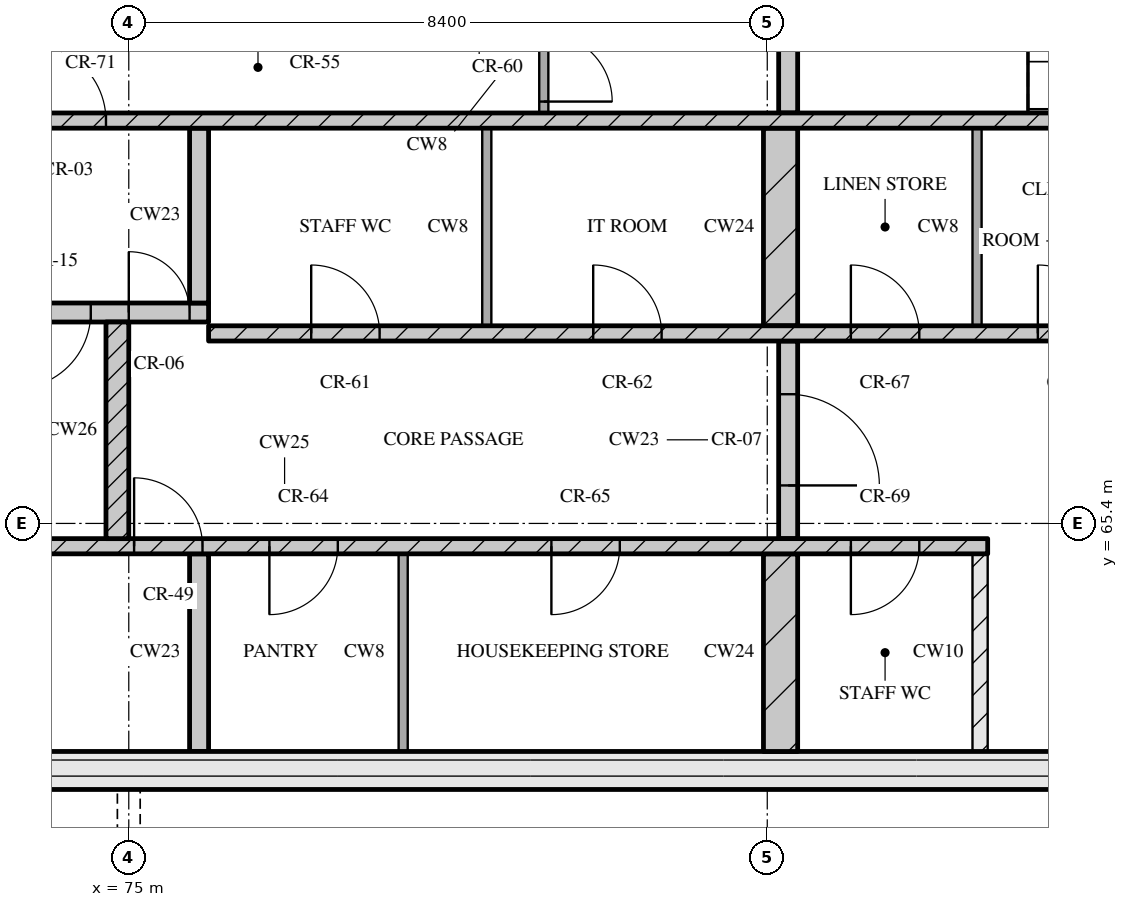
"""IFC4 building model, lengths in metres.
Left out: names, types, materials, properties, quantities, classifications, styles, units other than length and angle.
Written with IfcOpenShell. Run it as: python <this file> out.ifc"""

import sys

from ifc_helpers import new_model, si_unit, direction, frame, frame_2d, origin, place, context, subcontext, project, spatial, rectangle, extrude, element, fill, save


model = new_model("IFC4")
c1 = context("Model", 3, precision=1e-05, world=origin(), true_north=direction((0.0, 1.0)))
c2 = subcontext(c1, "Body", "Model", "MODEL_VIEW")
j1 = project(units=[si_unit("LENGTHUNIT", "METRE"), si_unit("PLANEANGLEUNIT", "RADIAN")], contexts=[c1])
p1 = place(None, origin())
s1 = spatial("IfcSite", under=j1, at=p1, CompositionType="ELEMENT")
p2 = place(p1, origin())
s2 = spatial("IfcBuilding", under=s1, at=p2, CompositionType="ELEMENT")
p3 = place(p2, frame((0.0, 0.0, 274.35)))
s3 = spatial("IfcBuildingStorey", under=s2, at=p3, CompositionType="ELEMENT", Elevation=274.35)
p4 = place(p3, frame((67.3, 62.15, 0.0), z_axis=(0.0, 0.0, 1.0), x_axis=(1.0, 0.0, 0.0)))
e1 = element("IfcWall", 1, at=p4, inside=s3, PredefinedType="SOLIDWALL", context=c2, shape_type="SweptSolid", body=[
    extrude(rectangle(XDim=40.6, YDim=0.5, at=frame_2d((20.3, 0.0))), origin(), (0.0, 0.0, 1.0), 3.32),
])
p5 = place(p4, frame((20.65, 0.0, 0.0)))
e2 = element("IfcOpeningElement", 2, at=p5, cuts=e1, PredefinedType="OPENING", context=c2, shape_type="SweptSolid", body=[
    extrude(rectangle(XDim=1.8, YDim=2.1, at=frame_2d((0.9, 1.05))), frame((0.0, 0.26, 0.0), z_axis=(0.0, -1.0, 0.0), x_axis=(1.0, 0.0, 0.0)), (0.0, 0.0, 1.0), 0.52),
])
p6 = place(p3, frame((75.925, 62.4, 0.0), z_axis=(0.0, 0.0, 1.0), x_axis=(0.0, 1.0, 0.0)))
e3 = element("IfcWall", 3, at=p6, inside=s3, PredefinedType="SOLIDWALL", context=c2, shape_type="SweptSolid", body=[
    extrude(rectangle(XDim=2.6, YDim=0.25, at=frame_2d((1.3, 0.0))), origin(), (0.0, 0.0, 1.0), 3.32),
])
p7 = place(p3, frame((78.61, 62.4, 0.0), z_axis=(0.0, 0.0, 1.0), x_axis=(0.0, 1.0, 0.0)))
e4 = element("IfcWall", 4, at=p7, inside=s3, PredefinedType="PARTITIONING", context=c2, shape_type="SweptSolid", body=[
    extrude(rectangle(XDim=2.6, YDim=0.12, at=frame_2d((1.3, 0.0))), origin(), (0.0, 0.0, 1.0), 3.32),
])
p8 = place(p3, frame((83.575, 62.4, 0.0), z_axis=(0.0, 0.0, 1.0), x_axis=(0.0, 1.0, 0.0)))
e5 = element("IfcWall", 5, at=p8, inside=s3, PredefinedType="SOLIDWALL", context=c2, shape_type="SweptSolid", body=[
    extrude(rectangle(XDim=2.6, YDim=0.45, at=frame_2d((1.3, 0.0))), origin(), (0.0, 0.0, 1.0), 3.32),
])
p9 = place(p3, frame((86.2, 62.4, 0.0), z_axis=(0.0, 0.0, 1.0), x_axis=(0.0, 1.0, 0.0)))
e6 = element("IfcWall", 6, at=p9, inside=s3, PredefinedType="PARTITIONING", context=c2, shape_type="SweptSolid", body=[
    extrude(rectangle(XDim=2.6, YDim=0.2, at=frame_2d((1.3, 0.0))), origin(), (0.0, 0.0, 1.0), 3.32),
])
p10 = place(p3, frame((67.8, 65.1, 0.0), z_axis=(0.0, 0.0, 1.0), x_axis=(1.0, 0.0, 0.0)))
e7 = element("IfcWall", 7, at=p10, inside=s3, PredefinedType="SOLIDWALL", context=c2, shape_type="SweptSolid", body=[
    extrude(rectangle(XDim=18.5, YDim=0.2, at=frame_2d((9.25, 0.0))), origin(), (0.0, 0.0, 1.0), 3.32),
])
p11 = place(p10, frame((7.27, 0.0, 0.0)))
e8 = element("IfcOpeningElement", 8, at=p11, cuts=e7, PredefinedType="OPENING", context=c2, shape_type="SweptSolid", body=[
    extrude(rectangle(XDim=0.9, YDim=2.1, at=frame_2d((0.45, 1.05))), frame((0.0, 0.11, 0.0), z_axis=(0.0, -1.0, 0.0), x_axis=(1.0, 0.0, 0.0)), (0.0, 0.0, 1.0), 0.22),
])
p12 = place(p10, frame((9.05, 0.0, 0.0)))
e9 = element("IfcOpeningElement", 9, at=p12, cuts=e7, PredefinedType="OPENING", context=c2, shape_type="SweptSolid", body=[
    extrude(rectangle(XDim=0.9, YDim=2.1, at=frame_2d((0.45, 1.05))), frame((0.0, 0.11, 0.0), z_axis=(0.0, -1.0, 0.0), x_axis=(1.0, 0.0, 0.0)), (0.0, 0.0, 1.0), 0.22),
])
p13 = place(p10, frame((12.76, 0.0, 0.0)))
e10 = element("IfcOpeningElement", 10, at=p13, cuts=e7, PredefinedType="OPENING", context=c2, shape_type="SweptSolid", body=[
    extrude(rectangle(XDim=0.9, YDim=2.1, at=frame_2d((0.45, 1.05))), frame((0.0, 0.11, 0.0), z_axis=(0.0, -1.0, 0.0), x_axis=(1.0, 0.0, 0.0)), (0.0, 0.0, 1.0), 0.22),
])
p14 = place(p10, frame((16.7, 0.0, 0.0)))
e11 = element("IfcOpeningElement", 11, at=p14, cuts=e7, PredefinedType="OPENING", context=c2, shape_type="SweptSolid", body=[
    extrude(rectangle(XDim=0.9, YDim=2.1, at=frame_2d((0.45, 1.05))), frame((0.0, 0.11, 0.0), z_axis=(0.0, -1.0, 0.0), x_axis=(1.0, 0.0, 0.0)), (0.0, 0.0, 1.0), 0.22),
])
p15 = place(p3, frame((74.85, 65.2, 0.0), z_axis=(0.0, 0.0, 1.0), x_axis=(0.0, 1.0, 0.0)))
e12 = element("IfcWall", 12, at=p15, inside=s3, PredefinedType="SOLIDWALL", context=c2, shape_type="SweptSolid", body=[
    extrude(rectangle(XDim=2.85, YDim=0.3, at=frame_2d((1.425, 0.0))), origin(), (0.0, 0.0, 1.0), 3.32),
])
p16 = place(p3, frame((83.675, 65.2, 0.0), z_axis=(0.0, 0.0, 1.0), x_axis=(0.0, 1.0, 0.0)))
e13 = element("IfcWall", 13, at=p16, inside=s3, PredefinedType="SOLIDWALL", context=c2, shape_type="SweptSolid", body=[
    extrude(rectangle(XDim=2.6, YDim=0.25, at=frame_2d((1.3, 0.0))), origin(), (0.0, 0.0, 1.0), 3.32),
])
p17 = place(p16, frame((0.7, 0.0, 0.0)))
e14 = element("IfcOpeningElement", 14, at=p17, cuts=e13, PredefinedType="OPENING", context=c2, shape_type="SweptSolid", body=[
    extrude(rectangle(XDim=1.2, YDim=2.1, at=frame_2d((0.6, 1.05))), frame((0.0, 0.135, 0.0), z_axis=(0.0, -1.0, 0.0), x_axis=(1.0, 0.0, 0.0)), (0.0, 0.0, 1.0), 0.27),
])
p18 = place(p3, frame((76.05, 67.9, 0.0), z_axis=(0.0, 0.0, 1.0), x_axis=(1.0, 0.0, 0.0)))
e15 = element("IfcWall", 15, at=p18, inside=s3, PredefinedType="SOLIDWALL", context=c2, shape_type="SweptSolid", body=[
    extrude(rectangle(XDim=23.1, YDim=0.2, at=frame_2d((11.55, 0.0))), origin(), (0.0, 0.0, 1.0), 3.32),
])
p19 = place(p18, frame((1.35, 0.0, 0.0)))
e16 = element("IfcOpeningElement", 16, at=p19, cuts=e15, PredefinedType="OPENING", context=c2, shape_type="SweptSolid", body=[
    extrude(rectangle(XDim=0.9, YDim=2.1, at=frame_2d((0.45, 1.05))), frame((0.0, 0.11, 0.0), z_axis=(0.0, -1.0, 0.0), x_axis=(1.0, 0.0, 0.0)), (0.0, 0.0, 1.0), 0.22),
])
p20 = place(p18, frame((5.06, 0.0, 0.0)))
e17 = element("IfcOpeningElement", 17, at=p20, cuts=e15, PredefinedType="OPENING", context=c2, shape_type="SweptSolid", body=[
    extrude(rectangle(XDim=0.9, YDim=2.1, at=frame_2d((0.45, 1.05))), frame((0.0, 0.11, 0.0), z_axis=(0.0, -1.0, 0.0), x_axis=(1.0, 0.0, 0.0)), (0.0, 0.0, 1.0), 0.22),
])
p21 = place(p18, frame((8.45, 0.0, 0.0)))
e18 = element("IfcOpeningElement", 18, at=p21, cuts=e15, PredefinedType="OPENING", context=c2, shape_type="SweptSolid", body=[
    extrude(rectangle(XDim=0.9, YDim=2.1, at=frame_2d((0.45, 1.05))), frame((0.0, 0.11, 0.0), z_axis=(0.0, -1.0, 0.0), x_axis=(1.0, 0.0, 0.0)), (0.0, 0.0, 1.0), 0.22),
])
p22 = place(p18, frame((10.91, 0.0, 0.0)))
e19 = element("IfcOpeningElement", 19, at=p22, cuts=e15, PredefinedType="OPENING", context=c2, shape_type="SweptSolid", body=[
    extrude(rectangle(XDim=0.9, YDim=2.1, at=frame_2d((0.45, 1.05))), frame((0.0, 0.11, 0.0), z_axis=(0.0, -1.0, 0.0), x_axis=(1.0, 0.0, 0.0)), (0.0, 0.0, 1.0), 0.22),
])
p23 = place(p18, frame((13.55, 0.0, 0.0)))
e20 = element("IfcOpeningElement", 20, at=p23, cuts=e15, PredefinedType="OPENING", context=c2, shape_type="SweptSolid", body=[
    extrude(rectangle(XDim=1.0, YDim=2.1, at=frame_2d((0.5, 1.05))), frame((0.0, 0.11, 0.0), z_axis=(0.0, -1.0, 0.0), x_axis=(1.0, 0.0, 0.0)), (0.0, 0.0, 1.0), 0.22),
])
p24 = place(p18, frame((16.2, 0.0, 0.0)))
e21 = element("IfcOpeningElement", 21, at=p24, cuts=e15, PredefinedType="OPENING", context=c2, shape_type="SweptSolid", body=[
    extrude(rectangle(XDim=1.1, YDim=2.1, at=frame_2d((0.55, 1.05))), frame((0.0, 0.11, 0.0), z_axis=(0.0, -1.0, 0.0), x_axis=(1.0, 0.0, 0.0)), (0.0, 0.0, 1.0), 0.22),
])
p25 = place(p18, frame((18.7, 0.0, 0.0)))
e22 = element("IfcOpeningElement", 22, at=p25, cuts=e15, PredefinedType="OPENING", context=c2, shape_type="SweptSolid", body=[
    extrude(rectangle(XDim=1.1, YDim=2.1, at=frame_2d((0.55, 1.05))), frame((0.0, 0.11, 0.0), z_axis=(0.0, -1.0, 0.0), x_axis=(1.0, 0.0, 0.0)), (0.0, 0.0, 1.0), 0.22),
])
p26 = place(p18, frame((21.2, 0.0, 0.0)))
e23 = element("IfcOpeningElement", 23, at=p26, cuts=e15, PredefinedType="OPENING", context=c2, shape_type="SweptSolid", body=[
    extrude(rectangle(XDim=1.1, YDim=2.1, at=frame_2d((0.55, 1.05))), frame((0.0, 0.11, 0.0), z_axis=(0.0, -1.0, 0.0), x_axis=(1.0, 0.0, 0.0)), (0.0, 0.0, 1.0), 0.22),
])
p27 = place(p3, frame((79.71, 68.0, 0.0), z_axis=(0.0, 0.0, 1.0), x_axis=(0.0, 1.0, 0.0)))
e24 = element("IfcWall", 24, at=p27, inside=s3, PredefinedType="PARTITIONING", context=c2, shape_type="SweptSolid", body=[
    extrude(rectangle(XDim=2.6, YDim=0.12, at=frame_2d((1.3, 0.0))), origin(), (0.0, 0.0, 1.0), 3.32),
])
p28 = place(p3, frame((83.575, 68.0, 0.0), z_axis=(0.0, 0.0, 1.0), x_axis=(0.0, 1.0, 0.0)))
e25 = element("IfcWall", 25, at=p28, inside=s3, PredefinedType="SOLIDWALL", context=c2, shape_type="SweptSolid", body=[
    extrude(rectangle(XDim=2.6, YDim=0.45, at=frame_2d((1.3, 0.0))), origin(), (0.0, 0.0, 1.0), 3.32),
])
p29 = place(p3, frame((86.16, 68.0, 0.0), z_axis=(0.0, 0.0, 1.0), x_axis=(0.0, 1.0, 0.0)))
e26 = element("IfcWall", 26, at=p29, inside=s3, PredefinedType="PARTITIONING", context=c2, shape_type="SweptSolid", body=[
    extrude(rectangle(XDim=2.6, YDim=0.12, at=frame_2d((1.3, 0.0))), origin(), (0.0, 0.0, 1.0), 3.32),
])
p30 = place(p3, frame((67.8, 68.175, 0.0), z_axis=(0.0, 0.0, 1.0), x_axis=(1.0, 0.0, 0.0)))
e27 = element("IfcWall", 27, at=p30, inside=s3, PredefinedType="SOLIDWALL", context=c2, shape_type="SweptSolid", body=[
    extrude(rectangle(XDim=8.25, YDim=0.25, at=frame_2d((4.125, 0.0))), origin(), (0.0, 0.0, 1.0), 3.32),
])
p31 = place(p30, frame((5.7, 0.0, 0.0)))
e28 = element("IfcOpeningElement", 28, at=p31, cuts=e27, PredefinedType="OPENING", context=c2, shape_type="SweptSolid", body=[
    extrude(rectangle(XDim=1.0, YDim=2.1, at=frame_2d((0.5, 1.05))), frame((0.0, 0.135, 0.0), z_axis=(0.0, -1.0, 0.0), x_axis=(1.0, 0.0, 0.0)), (0.0, 0.0, 1.0), 0.27),
])
p32 = place(p30, frame((7.2, 0.0, 0.0)))
e29 = element("IfcOpeningElement", 29, at=p32, cuts=e27, PredefinedType="OPENING", context=c2, shape_type="SweptSolid", body=[
    extrude(rectangle(XDim=0.8, YDim=2.1, at=frame_2d((0.4, 1.05))), frame((0.0, 0.135, 0.0), z_axis=(0.0, -1.0, 0.0), x_axis=(1.0, 0.0, 0.0)), (0.0, 0.0, 1.0), 0.27),
])
p33 = place(p3, frame((75.925, 68.3, 0.0), z_axis=(0.0, 0.0, 1.0), x_axis=(0.0, 1.0, 0.0)))
e30 = element("IfcWall", 30, at=p33, inside=s3, PredefinedType="SOLIDWALL", context=c2, shape_type="SweptSolid", body=[
    extrude(rectangle(XDim=2.3, YDim=0.25, at=frame_2d((1.15, 0.0))), origin(), (0.0, 0.0, 1.0), 3.32),
])
p34 = place(p3, frame((67.8, 70.7, 0.0), z_axis=(0.0, 0.0, 1.0), x_axis=(1.0, 0.0, 0.0)))
e31 = element("IfcWall", 31, at=p34, inside=s3, PredefinedType="SOLIDWALL", context=c2, shape_type="SweptSolid", body=[
    extrude(rectangle(XDim=39.6, YDim=0.2, at=frame_2d((19.8, 0.0))), origin(), (0.0, 0.0, 1.0), 3.32),
])
p35 = place(p34, frame((0.65, 0.0, 0.0)))
e32 = element("IfcOpeningElement", 32, at=p35, cuts=e31, PredefinedType="OPENING", context=c2, shape_type="SweptSolid", body=[
    extrude(rectangle(XDim=1.1, YDim=2.1, at=frame_2d((0.55, 1.05))), frame((0.0, 0.11, 0.0), z_axis=(0.0, -1.0, 0.0), x_axis=(1.0, 0.0, 0.0)), (0.0, 0.0, 1.0), 0.22),
])
p36 = place(p34, frame((3.25, 0.0, 0.0)))
e33 = element("IfcOpeningElement", 33, at=p36, cuts=e31, PredefinedType="OPENING", context=c2, shape_type="SweptSolid", body=[
    extrude(rectangle(XDim=1.1, YDim=2.1, at=frame_2d((0.55, 1.05))), frame((0.0, 0.11, 0.0), z_axis=(0.0, -1.0, 0.0), x_axis=(1.0, 0.0, 0.0)), (0.0, 0.0, 1.0), 0.22),
])
p37 = place(p34, frame((5.9, 0.0, 0.0)))
e34 = element("IfcOpeningElement", 34, at=p37, cuts=e31, PredefinedType="OPENING", context=c2, shape_type="SweptSolid", body=[
    extrude(rectangle(XDim=1.0, YDim=2.1, at=frame_2d((0.5, 1.05))), frame((0.0, 0.11, 0.0), z_axis=(0.0, -1.0, 0.0), x_axis=(1.0, 0.0, 0.0)), (0.0, 0.0, 1.0), 0.22),
])
p38 = place(p34, frame((21.7, 0.0, 0.0)))
e35 = element("IfcOpeningElement", 35, at=p38, cuts=e31, PredefinedType="OPENING", context=c2, shape_type="SweptSolid", body=[
    extrude(rectangle(XDim=1.0, YDim=2.1, at=frame_2d((0.5, 1.05))), frame((0.0, 0.11, 0.0), z_axis=(0.0, -1.0, 0.0), x_axis=(1.0, 0.0, 0.0)), (0.0, 0.0, 1.0), 0.22),
])
p39 = place(p34, frame((32.7, 0.0, 0.0)))
e36 = element("IfcOpeningElement", 36, at=p39, cuts=e31, PredefinedType="OPENING", context=c2, shape_type="SweptSolid", body=[
    extrude(rectangle(XDim=1.0, YDim=2.1, at=frame_2d((0.5, 1.05))), frame((0.0, 0.11, 0.0), z_axis=(0.0, -1.0, 0.0), x_axis=(1.0, 0.0, 0.0)), (0.0, 0.0, 1.0), 0.22),
])
p40 = place(p34, frame((35.25, 0.0, 0.0)))
e37 = element("IfcOpeningElement", 37, at=p40, cuts=e31, PredefinedType="OPENING", context=c2, shape_type="SweptSolid", body=[
    extrude(rectangle(XDim=1.1, YDim=2.1, at=frame_2d((0.55, 1.05))), frame((0.0, 0.11, 0.0), z_axis=(0.0, -1.0, 0.0), x_axis=(1.0, 0.0, 0.0)), (0.0, 0.0, 1.0), 0.22),
])
p41 = place(p34, frame((37.85, 0.0, 0.0)))
e38 = element("IfcOpeningElement", 38, at=p41, cuts=e31, PredefinedType="OPENING", context=c2, shape_type="SweptSolid", body=[
    extrude(rectangle(XDim=1.1, YDim=2.1, at=frame_2d((0.55, 1.05))), frame((0.0, 0.11, 0.0), z_axis=(0.0, -1.0, 0.0), x_axis=(1.0, 0.0, 0.0)), (0.0, 0.0, 1.0), 0.22),
])
p42 = place(p3, frame((80.46, 70.8, 0.0), z_axis=(0.0, 0.0, 1.0), x_axis=(0.0, 1.0, 0.0)))
e39 = element("IfcWall", 39, at=p42, inside=s3, PredefinedType="PARTITIONING", context=c2, shape_type="SweptSolid", body=[
    extrude(rectangle(XDim=1.2, YDim=0.12, at=frame_2d((0.6, 0.0))), origin(), (0.0, 0.0, 1.0), 3.32),
])
p43 = place(p42, frame((0.15, 0.0, 0.0)))
e40 = element("IfcOpeningElement", 40, at=p43, cuts=e39, PredefinedType="OPENING", context=c2, shape_type="SweptSolid", body=[
    extrude(rectangle(XDim=0.9, YDim=2.1, at=frame_2d((0.45, 1.05))), frame((0.0, 0.07, 0.0), z_axis=(0.0, -1.0, 0.0), x_axis=(1.0, 0.0, 0.0)), (0.0, 0.0, 1.0), 0.14),
])
p44 = place(p3, frame((83.675, 70.8, 0.0), z_axis=(0.0, 0.0, 1.0), x_axis=(0.0, 1.0, 0.0)))
e41 = element("IfcWall", 41, at=p44, inside=s3, PredefinedType="SOLIDWALL", context=c2, shape_type="SweptSolid", body=[
    extrude(rectangle(XDim=2.95, YDim=0.25, at=frame_2d((1.475, 0.0))), origin(), (0.0, 0.0, 1.0), 3.32),
])
p45 = place(p11, origin())
e42 = element("IfcDoor", 42, at=p45, inside=s3, OperationType="SINGLE_SWING_LEFT", PredefinedType="DOOR", context=c2, shape_type="SweptSolid", body=[
    extrude(rectangle(XDim=0.9, YDim=2.1, at=frame_2d((0.45, 1.05))), frame((0.0, 0.025, 0.0), z_axis=(0.0, -1.0, 0.0), x_axis=(1.0, 0.0, 0.0)), (0.0, 0.0, 1.0), 0.05),
])
fill(e8, e42)
p46 = place(p12, origin())
e43 = element("IfcDoor", 43, at=p46, inside=s3, OperationType="SINGLE_SWING_RIGHT", PredefinedType="DOOR", context=c2, shape_type="SweptSolid", body=[
    extrude(rectangle(XDim=0.9, YDim=2.1, at=frame_2d((0.45, 1.05))), frame((0.0, 0.025, 0.0), z_axis=(0.0, -1.0, 0.0), x_axis=(1.0, 0.0, 0.0)), (0.0, 0.0, 1.0), 0.05),
])
fill(e9, e43)
p47 = place(p13, origin())
e44 = element("IfcDoor", 44, at=p47, inside=s3, OperationType="SINGLE_SWING_RIGHT", PredefinedType="DOOR", context=c2, shape_type="SweptSolid", body=[
    extrude(rectangle(XDim=0.9, YDim=2.1, at=frame_2d((0.45, 1.05))), frame((0.0, 0.025, 0.0), z_axis=(0.0, -1.0, 0.0), x_axis=(1.0, 0.0, 0.0)), (0.0, 0.0, 1.0), 0.05),
])
fill(e10, e44)
p48 = place(p14, origin())
e45 = element("IfcDoor", 45, at=p48, inside=s3, OperationType="SINGLE_SWING_RIGHT", PredefinedType="DOOR", context=c2, shape_type="SweptSolid", body=[
    extrude(rectangle(XDim=0.9, YDim=2.1, at=frame_2d((0.45, 1.05))), frame((0.0, 0.025, 0.0), z_axis=(0.0, -1.0, 0.0), x_axis=(1.0, 0.0, 0.0)), (0.0, 0.0, 1.0), 0.05),
])
fill(e11, e45)
p49 = place(p17, origin())
e46 = element("IfcDoor", 46, at=p49, inside=s3, OperationType="SINGLE_SWING_RIGHT", PredefinedType="DOOR", context=c2, shape_type="SweptSolid", body=[
    extrude(rectangle(XDim=1.2, YDim=2.1, at=frame_2d((0.6, 1.05))), frame((0.0, 0.025, 0.0), z_axis=(0.0, -1.0, 0.0), x_axis=(1.0, 0.0, 0.0)), (0.0, 0.0, 1.0), 0.05),
])
fill(e14, e46)
p50 = place(p19, origin())
e47 = element("IfcDoor", 47, at=p50, inside=s3, OperationType="SINGLE_SWING_LEFT", PredefinedType="DOOR", context=c2, shape_type="SweptSolid", body=[
    extrude(rectangle(XDim=0.9, YDim=2.1, at=frame_2d((0.45, 1.05))), frame((0.0, 0.025, 0.0), z_axis=(0.0, -1.0, 0.0), x_axis=(1.0, 0.0, 0.0)), (0.0, 0.0, 1.0), 0.05),
])
fill(e16, e47)
p51 = place(p20, origin())
e48 = element("IfcDoor", 48, at=p51, inside=s3, OperationType="SINGLE_SWING_LEFT", PredefinedType="DOOR", context=c2, shape_type="SweptSolid", body=[
    extrude(rectangle(XDim=0.9, YDim=2.1, at=frame_2d((0.45, 1.05))), frame((0.0, 0.025, 0.0), z_axis=(0.0, -1.0, 0.0), x_axis=(1.0, 0.0, 0.0)), (0.0, 0.0, 1.0), 0.05),
])
fill(e17, e48)
p52 = place(p21, origin())
e49 = element("IfcDoor", 49, at=p52, inside=s3, OperationType="SINGLE_SWING_LEFT", PredefinedType="DOOR", context=c2, shape_type="SweptSolid", body=[
    extrude(rectangle(XDim=0.9, YDim=2.1, at=frame_2d((0.45, 1.05))), frame((0.0, 0.025, 0.0), z_axis=(0.0, -1.0, 0.0), x_axis=(1.0, 0.0, 0.0)), (0.0, 0.0, 1.0), 0.05),
])
fill(e18, e49)
p53 = place(p22, origin())
e50 = element("IfcDoor", 50, at=p53, inside=s3, OperationType="SINGLE_SWING_LEFT", PredefinedType="DOOR", context=c2, shape_type="SweptSolid", body=[
    extrude(rectangle(XDim=0.9, YDim=2.1, at=frame_2d((0.45, 1.05))), frame((0.0, 0.025, 0.0), z_axis=(0.0, -1.0, 0.0), x_axis=(1.0, 0.0, 0.0)), (0.0, 0.0, 1.0), 0.05),
])
fill(e19, e50)
p54 = place(p31, origin())
e51 = element("IfcDoor", 51, at=p54, inside=s3, OperationType="SINGLE_SWING_RIGHT", PredefinedType="DOOR", context=c2, shape_type="SweptSolid", body=[
    extrude(rectangle(XDim=1.0, YDim=2.1, at=frame_2d((0.5, 1.05))), frame((0.0, 0.025, 0.0), z_axis=(0.0, -1.0, 0.0), x_axis=(1.0, 0.0, 0.0)), (0.0, 0.0, 1.0), 0.05),
])
fill(e28, e51)
p55 = place(p32, origin())
e52 = element("IfcDoor", 52, at=p55, inside=s3, OperationType="SINGLE_SWING_LEFT", PredefinedType="DOOR", context=c2, shape_type="SweptSolid", body=[
    extrude(rectangle(XDim=0.8, YDim=2.1, at=frame_2d((0.4, 1.05))), frame((0.0, 0.025, 0.0), z_axis=(0.0, -1.0, 0.0), x_axis=(1.0, 0.0, 0.0)), (0.0, 0.0, 1.0), 0.05),
])
fill(e29, e52)
p56 = place(p37, origin())
e53 = element("IfcDoor", 53, at=p56, inside=s3, OperationType="SINGLE_SWING_LEFT", PredefinedType="DOOR", context=c2, shape_type="SweptSolid", body=[
    extrude(rectangle(XDim=1.0, YDim=2.1, at=frame_2d((0.5, 1.05))), frame((0.0, 0.025, 0.0), z_axis=(0.0, -1.0, 0.0), x_axis=(1.0, 0.0, 0.0)), (0.0, 0.0, 1.0), 0.05),
])
fill(e34, e53)
p57 = place(p43, origin())
e54 = element("IfcDoor", 54, at=p57, inside=s3, OperationType="SINGLE_SWING_RIGHT", PredefinedType="DOOR", context=c2, shape_type="SweptSolid", body=[
    extrude(rectangle(XDim=0.9, YDim=2.1, at=frame_2d((0.45, 1.05))), frame((0.0, 0.025, 0.0), z_axis=(0.0, -1.0, 0.0), x_axis=(1.0, 0.0, 0.0)), (0.0, 0.0, 1.0), 0.05),
])
fill(e40, e54)
save(model, sys.argv[1])
